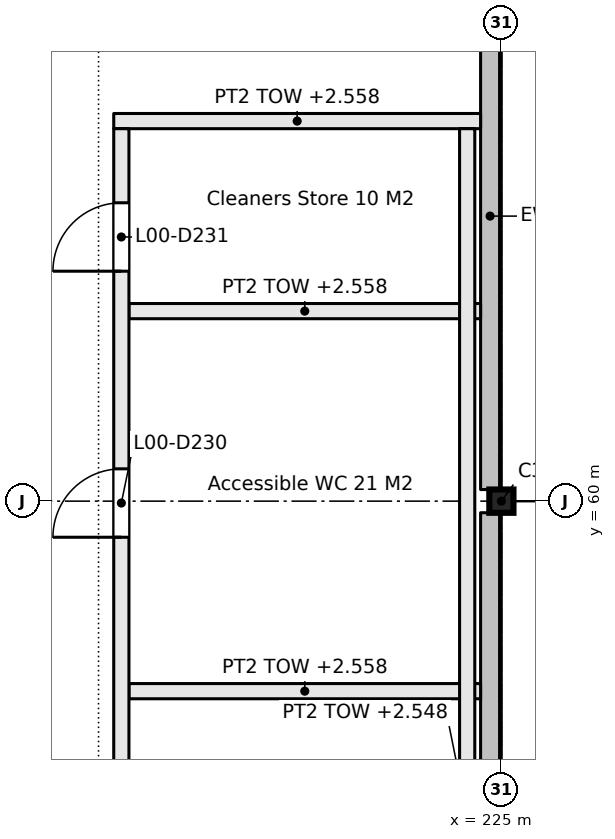
"""IFC4 building model, lengths in metres.
Left out: names, types, materials, properties, quantities, classifications, styles, units other than length and angle.
Written with IfcOpenShell. Run it as: python <this file> out.ifc"""

import sys

from ifc_helpers import new_model, si_unit, direction, frame, frame_2d, origin, origin_2d, place, context, subcontext, project, spatial, rectangle, i_section, extrude, element, fill, save


model = new_model("IFC4")
c1 = context("Model", 3, precision=1e-05, world=origin(), true_north=direction((0.0, 1.0)))
c2 = subcontext(c1, "Body", "Model", "MODEL_VIEW")
j1 = project(units=[si_unit("LENGTHUNIT", "METRE"), si_unit("PLANEANGLEUNIT", "RADIAN")], contexts=[c1])
p1 = place(None, origin())
s1 = spatial("IfcSite", under=j1, at=p1, CompositionType="ELEMENT")
p2 = place(p1, origin())
s2 = spatial("IfcBuilding", under=s1, at=p2, CompositionType="ELEMENT")
p3 = place(p2, origin())
s3 = spatial("IfcBuildingStorey", under=s2, at=p3, CompositionType="ELEMENT", Elevation=0.0)
p4 = place(p3, frame((225.0, 60.0, -0.25), z_axis=(0.0, 0.0, 1.0), x_axis=(0.0, 1.0, 0.0)))
e1 = element("IfcColumn", 1, at=p4, inside=s3, PredefinedType="COLUMN", context=c2, shape_type="SweptSolid", body=[
    extrude(i_section(OverallWidth=0.307, OverallDepth=0.318, WebThickness=0.013, FlangeThickness=0.021, FilletRadius=0.015, at=origin_2d()), origin(), (0.0, 0.0, 1.0), 3.55),
])
for number, where, z_axis, x_axis in (
    (2, (220.1, 57.5, 0.0), (0.0, 0.0, 1.0), (1.0, 0.0, 0.0)),
    (3, (220.1, 62.5, 0.0), (0.0, 0.0, 1.0), (1.0, 0.0, 0.0)),
):
    element("IfcWall", number, at=place(p3, frame(where, z_axis=z_axis, x_axis=x_axis)), inside=s3, PredefinedType="PARTITIONING", context=c2, shape_type="SweptSolid", body=[
        extrude(rectangle(XDim=4.626, YDim=0.2, at=frame_2d((2.313, 0.0))), origin(), (0.0, 0.0, 1.0), 2.558),
    ])
p5 = place(p3, frame((219.9, 65.0, 0.0), z_axis=(0.0, 0.0, 1.0), x_axis=(1.0, 0.0, 0.0)))
e4 = element("IfcWall", 4, at=p5, inside=s3, PredefinedType="PARTITIONING", context=c2, shape_type="SweptSolid", body=[
    extrude(rectangle(XDim=4.826, YDim=0.2, at=frame_2d((2.413, 0.0))), origin(), (0.0, 0.0, 1.0), 2.558),
])
p6 = place(p3, frame((220.0, 40.1, 0.0), z_axis=(0.0, 0.0, 1.0), x_axis=(0.0, 1.0, 0.0)))
e5 = element("IfcWall", 5, at=p6, inside=s3, PredefinedType="PARTITIONING", context=c2, shape_type="SweptSolid", body=[
    extrude(rectangle(XDim=24.8, YDim=0.2, at=frame_2d((12.4, 0.0))), origin(), (0.0, 0.0, 1.0), 2.548),
])
p7 = place(p6, frame((3.3, 0.0, 0.0)))
e6 = element("IfcOpeningElement", 6, at=p7, cuts=e5, PredefinedType="OPENING", context=c2, shape_type="SweptSolid", body=[
    extrude(rectangle(XDim=0.9, YDim=2.1, at=frame_2d((0.45, 1.05))), frame((0.0, 0.11, 0.0), z_axis=(0.0, -1.0, 0.0), x_axis=(1.0, 0.0, 0.0)), (0.0, 0.0, 1.0), 0.22),
])
p8 = place(p6, frame((12.425, 0.0, 0.0)))
e7 = element("IfcOpeningElement", 7, at=p8, cuts=e5, PredefinedType="OPENING", context=c2, shape_type="SweptSolid", body=[
    extrude(rectangle(XDim=0.9, YDim=2.1, at=frame_2d((0.45, 1.05))), frame((0.0, 0.11, 0.0), z_axis=(0.0, -1.0, 0.0), x_axis=(1.0, 0.0, 0.0)), (0.0, 0.0, 1.0), 0.22),
])
p9 = place(p6, frame((19.425, 0.0, 0.0)))
e8 = element("IfcOpeningElement", 8, at=p9, cuts=e5, PredefinedType="OPENING", context=c2, shape_type="SweptSolid", body=[
    extrude(rectangle(XDim=0.9, YDim=2.1, at=frame_2d((0.45, 1.05))), frame((0.0, 0.11, 0.0), z_axis=(0.0, -1.0, 0.0), x_axis=(1.0, 0.0, 0.0)), (0.0, 0.0, 1.0), 0.22),
])
p10 = place(p6, frame((22.925, 0.0, 0.0)))
e9 = element("IfcOpeningElement", 9, at=p10, cuts=e5, PredefinedType="OPENING", context=c2, shape_type="SweptSolid", body=[
    extrude(rectangle(XDim=0.9, YDim=2.1, at=frame_2d((0.45, 1.05))), frame((0.0, 0.11, 0.0), z_axis=(0.0, -1.0, 0.0), x_axis=(1.0, 0.0, 0.0)), (0.0, 0.0, 1.0), 0.22),
])
p11 = place(p3, frame((224.55, 40.1, 0.0), z_axis=(0.0, 0.0, 1.0), x_axis=(0.0, 1.0, 0.0)))
e10 = element("IfcWall", 10, at=p11, inside=s3, PredefinedType="PARTITIONING", context=c2, shape_type="SweptSolid", body=[
    extrude(rectangle(XDim=24.8, YDim=0.2, at=frame_2d((12.4, 0.0))), origin(), (0.0, 0.0, 1.0), 2.548),
])
for number, where, z_axis, x_axis in (
    (11, (224.851, 52.653, 0.0), (0.0, 0.0, 1.0), (0.0, 1.0, 0.0)),
    (12, (224.851, 60.153, 0.0), (0.0, 0.0, 1.0), (0.0, 1.0, 0.0)),
):
    element("IfcWall", number, at=place(p3, frame(where, z_axis=z_axis, x_axis=x_axis)), inside=s3, PredefinedType="SOLIDWALL", context=c2, shape_type="SweptSolid", body=[
        extrude(rectangle(XDim=7.195, YDim=0.25, at=frame_2d((3.597, 0.0))), origin(), (0.0, 0.0, 1.0), 2.6),
    ])
p12 = place(p9, origin())
e13 = element("IfcDoor", 13, at=p12, inside=s3, OperationType="SINGLE_SWING_RIGHT", PredefinedType="DOOR", context=c2, shape_type="SweptSolid", body=[
    extrude(rectangle(XDim=0.9, YDim=2.1, at=frame_2d((0.45, 1.05))), frame((0.0, 0.025, 0.0), z_axis=(0.0, -1.0, 0.0), x_axis=(1.0, 0.0, 0.0)), (0.0, 0.0, 1.0), 0.05),
])
fill(e8, e13)
p13 = place(p10, origin())
e14 = element("IfcDoor", 14, at=p13, inside=s3, OperationType="SINGLE_SWING_RIGHT", PredefinedType="DOOR", context=c2, shape_type="SweptSolid", body=[
    extrude(rectangle(XDim=0.9, YDim=2.1, at=frame_2d((0.45, 1.05))), frame((0.0, 0.025, 0.0), z_axis=(0.0, -1.0, 0.0), x_axis=(1.0, 0.0, 0.0)), (0.0, 0.0, 1.0), 0.05),
])
fill(e9, e14)
save(model, sys.argv[1])
